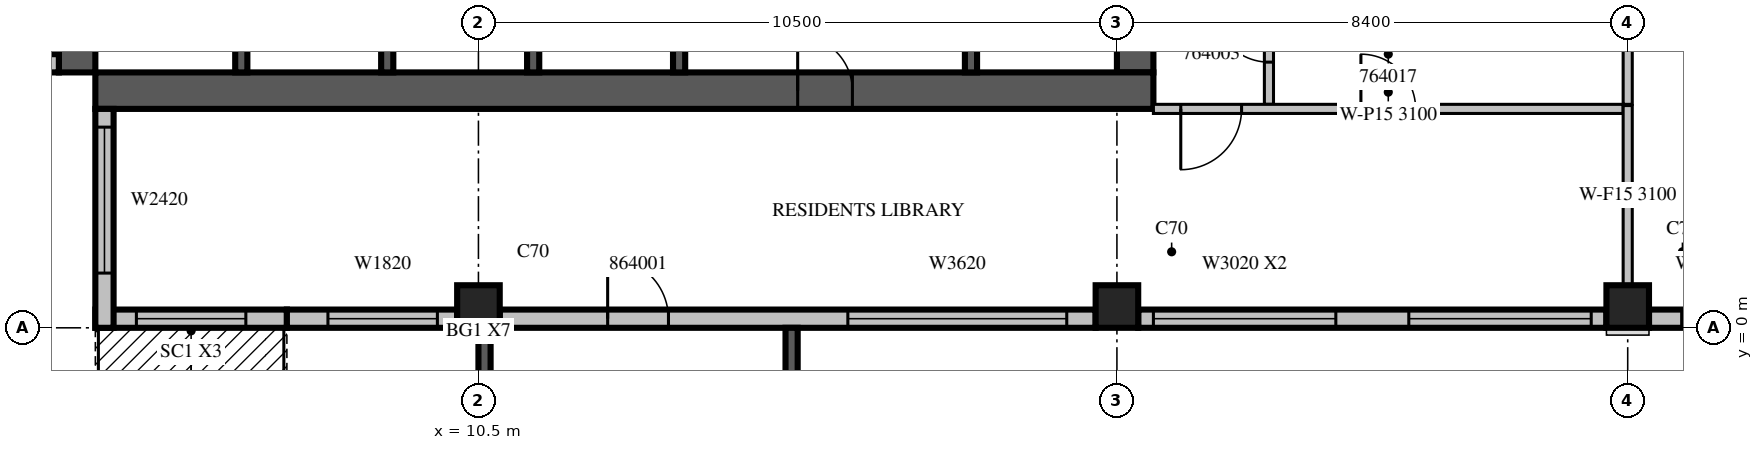
"""IFC4 building model, lengths in metres.
Left out: names, types, materials, properties, quantities, classifications, styles, units other than length and angle.
Written with IfcOpenShell. Run it as: python <this file> out.ifc"""

import sys

from ifc_helpers import new_model, si_unit, direction, frame, frame_2d, origin, origin_2d, place, context, subcontext, project, spatial, rectangle, extrude, source, transform, mapped, element, fill, save


model = new_model("IFC4")
c1 = context("Model", 3, precision=1e-05, world=origin(), true_north=direction((0.0, 1.0)))
c2 = subcontext(c1, "Body", "Model", "MODEL_VIEW")
j1 = project(units=[si_unit("LENGTHUNIT", "METRE"), si_unit("PLANEANGLEUNIT", "RADIAN")], contexts=[c1])
p1 = place(None, origin())
s1 = spatial("IfcSite", under=j1, at=p1, CompositionType="ELEMENT")
p2 = place(p1, origin())
s2 = spatial("IfcBuilding", under=s1, at=p2, CompositionType="ELEMENT")
p3 = place(p2, frame((0.0, 0.0, 284.5)))
s3 = spatial("IfcBuildingStorey", under=s2, at=p3, CompositionType="ELEMENT", Elevation=284.5)
p4 = place(p3, frame((10.5, 0.35, 0.0), z_axis=(0.0, 0.0, 1.0), x_axis=(1.0, 0.0, 0.0)))
e1 = element("IfcColumn", 1, at=p4, inside=s3, PredefinedType="COLUMN", context=c2, shape_type="SweptSolid", body=[
    extrude(rectangle(XDim=0.7, YDim=0.7, at=origin_2d()), origin(), (0.0, 0.0, 1.0), 3.5),
])
m1 = source(origin(), c2, "Body", "SweptSolid", [
    extrude(rectangle(XDim=0.7, YDim=0.7, at=origin_2d()), origin(), (0.0, 0.0, 1.0), 3.5),
])
for number, where, z_axis, x_axis in (
    (2, (21.0, 0.35, 0.0), (0.0, 0.0, 1.0), (1.0, 0.0, 0.0)),
    (3, (29.4, 0.35, 0.0), (0.0, 0.0, 1.0), (1.0, 0.0, 0.0)),
):
    element("IfcColumn", number, at=place(p3, frame(where, z_axis=z_axis, x_axis=x_axis)), inside=s3, PredefinedType="COLUMN", context=c2, shape_type="MappedRepresentation", body=[
        mapped(m1, transform((0.0, 0.0, 0.0), scale=1.0)),
    ])
p5 = place(p3, frame((3.9, 4.2, 0.0), z_axis=(0.0, 0.0, 1.0), x_axis=(0.0, 1.0, 0.0)))
e4 = element("IfcWall", 4, at=p5, inside=s3, PredefinedType="SHEAR", context=c2, shape_type="SweptSolid", body=[
    extrude(rectangle(XDim=17.4, YDim=0.6, at=frame_2d((8.7, 0.0))), origin(), (0.0, 0.0, 1.0), 3.5),
])
m2 = source(origin(), c2, "Body", "SweptSolid", [
    extrude(rectangle(XDim=2.2, YDim=2.1, at=frame_2d((1.1, 1.05))), frame((0.0, 0.31, 0.0), z_axis=(0.0, -1.0, 0.0), x_axis=(1.0, 0.0, 0.0)), (0.0, 0.0, 1.0), 0.62),
])
p6 = place(p5, frame((4.2, 0.0, 0.0)))
e5 = element("IfcOpeningElement", 5, at=p6, cuts=e4, PredefinedType="OPENING", context=c2, shape_type="MappedRepresentation", body=[
    mapped(m2, transform((0.0, 0.0, 0.0), scale=1.0)),
])
p7 = place(p3, frame((21.3, 4.2, 0.0), z_axis=(0.0, 0.0, 1.0), x_axis=(0.0, 1.0, 0.0)))
e6 = element("IfcWall", 6, at=p7, inside=s3, PredefinedType="SHEAR", context=c2, shape_type="SweptSolid", body=[
    extrude(rectangle(XDim=6.3, YDim=0.6, at=frame_2d((3.15, 0.0))), origin(), (0.0, 0.0, 1.0), 3.5),
])
p8 = place(p7, frame((4.0, 0.0, 0.0)))
e7 = element("IfcOpeningElement", 7, at=p8, cuts=e6, PredefinedType="OPENING", context=c2, shape_type="SweptSolid", body=[
    extrude(rectangle(XDim=2.2, YDim=2.1, at=frame_2d((1.1, 1.05))), frame((0.0, 0.31, 0.0), z_axis=(0.0, -1.0, 0.0), x_axis=(1.0, 0.0, 0.0)), (0.0, 0.0, 1.0), 0.62),
])
m3 = source(origin(), c2, "Body", "SweptSolid", [
    extrude(rectangle(XDim=17.4, YDim=0.6, at=frame_2d((8.7, 0.0))), origin(), (0.0, 0.0, 1.0), 3.5),
])
p9 = place(p3, frame((4.2, 3.9, 0.0), z_axis=(0.0, 0.0, 1.0), x_axis=(1.0, 0.0, 0.0)))
e8 = element("IfcWall", 8, at=p9, inside=s3, PredefinedType="SHEAR", context=c2, shape_type="MappedRepresentation", body=[
    mapped(m3, transform((0.0, 0.0, 0.0), scale=1.0)),
])
p10 = place(p9, frame((11.55, 0.0, 0.0)))
e9 = element("IfcOpeningElement", 9, at=p10, cuts=e8, PredefinedType="OPENING", context=c2, shape_type="SweptSolid", body=[
    extrude(rectangle(XDim=0.9, YDim=2.1, at=frame_2d((0.45, 1.05))), frame((0.0, 0.31, 0.0), z_axis=(0.0, -1.0, 0.0), x_axis=(1.0, 0.0, 0.0)), (0.0, 0.0, 1.0), 0.62),
])
p11 = place(p3, frame((4.2, 0.15, 0.0), z_axis=(0.0, 0.0, 1.0), x_axis=(1.0, 0.0, 0.0)))
e10 = element("IfcWall", 10, at=p11, inside=s3, PredefinedType="STANDARD", context=c2, shape_type="SweptSolid", body=[
    extrude(rectangle(XDim=3.15, YDim=0.3, at=frame_2d((1.575, 0.0))), origin(), (0.0, 0.0, 1.0), 3.1),
])
m4 = source(origin(), c2, "Body", "SweptSolid", [
    extrude(rectangle(XDim=1.8, YDim=2.4, at=frame_2d((0.9, 1.2))), frame((0.0, 0.16, 0.0), z_axis=(0.0, -1.0, 0.0), x_axis=(1.0, 0.0, 0.0)), (0.0, 0.0, 1.0), 0.32),
])
p12 = place(p11, frame((0.675, 0.0, 0.0)))
e11 = element("IfcOpeningElement", 11, at=p12, cuts=e10, PredefinedType="OPENING", context=c2, shape_type="MappedRepresentation", body=[
    mapped(m4, transform((0.0, 0.0, 0.0), scale=1.0)),
])
p13 = place(p3, frame((7.35, 0.15, 0.0), z_axis=(0.0, 0.0, 1.0), x_axis=(1.0, 0.0, 0.0)))
e12 = element("IfcWall", 12, at=p13, inside=s3, PredefinedType="STANDARD", context=c2, shape_type="SweptSolid", body=[
    extrude(rectangle(XDim=2.8, YDim=0.3, at=frame_2d((1.4, 0.0))), origin(), (0.0, 0.0, 1.0), 3.1),
])
p14 = place(p13, frame((0.675, 0.0, 0.6)))
e13 = element("IfcOpeningElement", 13, at=p14, cuts=e12, PredefinedType="OPENING", context=c2, shape_type="SweptSolid", body=[
    extrude(rectangle(XDim=1.8, YDim=2.0, at=frame_2d((0.9, 1.0))), frame((0.0, 0.16, 0.0), z_axis=(0.0, -1.0, 0.0), x_axis=(1.0, 0.0, 0.0)), (0.0, 0.0, 1.0), 0.32),
])
p15 = place(p3, frame((10.85, 0.15, 0.0), z_axis=(0.0, 0.0, 1.0), x_axis=(1.0, 0.0, 0.0)))
e14 = element("IfcWall", 14, at=p15, inside=s3, PredefinedType="STANDARD", context=c2, shape_type="SweptSolid", body=[
    extrude(rectangle(XDim=9.8, YDim=0.3, at=frame_2d((4.9, 0.0))), origin(), (0.0, 0.0, 1.0), 3.1),
])
p16 = place(p15, frame((5.725, 0.0, 0.6)))
e15 = element("IfcOpeningElement", 15, at=p16, cuts=e14, PredefinedType="OPENING", context=c2, shape_type="SweptSolid", body=[
    extrude(rectangle(XDim=3.6, YDim=2.0, at=frame_2d((1.8, 1.0))), frame((0.0, 0.16, 0.0), z_axis=(0.0, -1.0, 0.0), x_axis=(1.0, 0.0, 0.0)), (0.0, 0.0, 1.0), 0.32),
])
m5 = source(origin(), c2, "Body", "SweptSolid", [
    extrude(rectangle(XDim=1.0, YDim=2.1, at=frame_2d((0.5, 1.05))), frame((0.0, 0.16, 0.0), z_axis=(0.0, -1.0, 0.0), x_axis=(1.0, 0.0, 0.0)), (0.0, 0.0, 1.0), 0.32),
])
p17 = place(p15, frame((1.775, 0.0, 0.0)))
e16 = element("IfcOpeningElement", 16, at=p17, cuts=e14, PredefinedType="OPENING", context=c2, shape_type="MappedRepresentation", body=[
    mapped(m5, transform((0.0, 0.0, 0.0), scale=1.0)),
])
p18 = place(p3, frame((21.35, 0.15, 0.0), z_axis=(0.0, 0.0, 1.0), x_axis=(1.0, 0.0, 0.0)))
e17 = element("IfcWall", 17, at=p18, inside=s3, PredefinedType="STANDARD", context=c2, shape_type="SweptSolid", body=[
    extrude(rectangle(XDim=7.7, YDim=0.3, at=frame_2d((3.85, 0.0))), origin(), (0.0, 0.0, 1.0), 3.1),
])
p19 = place(p18, frame((0.25, 0.0, 0.6)))
e18 = element("IfcOpeningElement", 18, at=p19, cuts=e17, PredefinedType="OPENING", context=c2, shape_type="SweptSolid", body=[
    extrude(rectangle(XDim=3.0, YDim=2.0, at=frame_2d((1.5, 1.0))), frame((0.0, 0.16, 0.0), z_axis=(0.0, -1.0, 0.0), x_axis=(1.0, 0.0, 0.0)), (0.0, 0.0, 1.0), 0.32),
])
m6 = source(origin(), c2, "Body", "SweptSolid", [
    extrude(rectangle(XDim=3.0, YDim=2.0, at=frame_2d((1.5, 1.0))), frame((0.0, 0.16, 0.0), z_axis=(0.0, -1.0, 0.0), x_axis=(1.0, 0.0, 0.0)), (0.0, 0.0, 1.0), 0.32),
])
p20 = place(p18, frame((4.45, 0.0, 0.6)))
e19 = element("IfcOpeningElement", 19, at=p20, cuts=e17, PredefinedType="OPENING", context=c2, shape_type="MappedRepresentation", body=[
    mapped(m6, transform((0.0, 0.0, 0.0), scale=1.0)),
])
m7 = source(origin(), c2, "Body", "SweptSolid", [
    extrude(rectangle(XDim=7.7, YDim=0.3, at=frame_2d((3.85, 0.0))), origin(), (0.0, 0.0, 1.0), 3.1),
])
p21 = place(p3, frame((29.75, 0.15, 0.0), z_axis=(0.0, 0.0, 1.0), x_axis=(1.0, 0.0, 0.0)))
e20 = element("IfcWall", 20, at=p21, inside=s3, PredefinedType="STANDARD", context=c2, shape_type="MappedRepresentation", body=[
    mapped(m7, transform((0.0, 0.0, 0.0), scale=1.0)),
])
p22 = place(p21, frame((0.537, 0.0, 0.6)))
e21 = element("IfcOpeningElement", 21, at=p22, cuts=e20, PredefinedType="OPENING", context=c2, shape_type="SweptSolid", body=[
    extrude(rectangle(XDim=1.2, YDim=2.0, at=frame_2d((0.6, 1.0))), frame((0.0, 0.16, 0.0), z_axis=(0.0, -1.0, 0.0), x_axis=(1.0, 0.0, 0.0)), (0.0, 0.0, 1.0), 0.32),
])
m8 = source(origin(), c2, "Body", "SweptSolid", [
    extrude(rectangle(XDim=1.2, YDim=2.0, at=frame_2d((0.6, 1.0))), frame((0.0, 0.16, 0.0), z_axis=(0.0, -1.0, 0.0), x_axis=(1.0, 0.0, 0.0)), (0.0, 0.0, 1.0), 0.32),
])
p23 = place(p21, frame((6.062, 0.0, 0.6)))
e22 = element("IfcOpeningElement", 22, at=p23, cuts=e20, PredefinedType="OPENING", context=c2, shape_type="MappedRepresentation", body=[
    mapped(m8, transform((0.0, 0.0, 0.0), scale=1.0)),
])
p24 = place(p21, frame((2.7, 0.0, 0.6)))
e23 = element("IfcOpeningElement", 23, at=p24, cuts=e20, PredefinedType="OPENING", context=c2, shape_type="SweptSolid", body=[
    extrude(rectangle(XDim=2.4, YDim=2.0, at=frame_2d((1.2, 1.0))), frame((0.0, 0.16, 0.0), z_axis=(0.0, -1.0, 0.0), x_axis=(1.0, 0.0, 0.0)), (0.0, 0.0, 1.0), 0.32),
])
p25 = place(p3, frame((0.0, 4.35, 0.0), z_axis=(0.0, 0.0, 1.0), x_axis=(1.0, 0.0, 0.0)))
e24 = element("IfcWall", 24, at=p25, inside=s3, PredefinedType="STANDARD", context=c2, shape_type="SweptSolid", body=[
    extrude(rectangle(XDim=3.6, YDim=0.3, at=frame_2d((1.8, 0.0))), origin(), (0.0, 0.0, 1.0), 3.1),
])
m9 = source(origin(), c2, "Body", "SweptSolid", [
    extrude(rectangle(XDim=2.4, YDim=2.0, at=frame_2d((1.2, 1.0))), frame((0.0, 0.16, 0.0), z_axis=(0.0, -1.0, 0.0), x_axis=(1.0, 0.0, 0.0)), (0.0, 0.0, 1.0), 0.32),
])
p26 = place(p25, frame((0.9, 0.0, 0.6)))
e25 = element("IfcOpeningElement", 25, at=p26, cuts=e24, PredefinedType="OPENING", context=c2, shape_type="MappedRepresentation", body=[
    mapped(m9, transform((0.0, 0.0, 0.0), scale=1.0)),
])
m10 = source(origin(), c2, "Body", "SweptSolid", [
    extrude(rectangle(XDim=3.6, YDim=0.3, at=frame_2d((1.8, 0.0))), origin(), (0.0, 0.0, 1.0), 3.1),
])
p27 = place(p3, frame((4.35, 3.6, 0.0), z_axis=(0.0, 0.0, 1.0), x_axis=(0.0, -1.0, 0.0)))
e26 = element("IfcWall", 26, at=p27, inside=s3, PredefinedType="STANDARD", context=c2, shape_type="MappedRepresentation", body=[
    mapped(m10, transform((0.0, 0.0, 0.0), scale=1.0)),
])
p28 = place(p27, frame((0.3, 0.0, 0.6)))
e27 = element("IfcOpeningElement", 27, at=p28, cuts=e26, PredefinedType="OPENING", context=c2, shape_type="MappedRepresentation", body=[
    mapped(m9, transform((0.0, 0.0, 0.0), scale=1.0)),
])
p29 = place(p3, frame((10.6, 0.0, 0.0), z_axis=(0.0, 0.0, 1.0), x_axis=(0.0, -1.0, 0.0)))
e28 = element("IfcWall", 28, at=p29, inside=s3, PredefinedType="SOLIDWALL", context=c2, shape_type="SweptSolid", body=[
    extrude(rectangle(XDim=3.9, YDim=0.2, at=frame_2d((1.95, 0.0))), origin(), (0.0, 0.0, 1.0), 3.09),
])
p30 = place(p29, frame((0.75, 0.0, 0.6)))
e29 = element("IfcOpeningElement", 29, at=p30, cuts=e28, PredefinedType="OPENING", context=c2, shape_type="SweptSolid", body=[
    extrude(rectangle(XDim=2.4, YDim=2.0, at=frame_2d((1.2, 1.0))), frame((0.0, 0.11, 0.0), z_axis=(0.0, -1.0, 0.0), x_axis=(1.0, 0.0, 0.0)), (0.0, 0.0, 1.0), 0.22),
])
m11 = source(origin(), c2, "Body", "SweptSolid", [
    extrude(rectangle(XDim=3.9, YDim=0.2, at=frame_2d((1.95, 0.0))), origin(), (0.0, 0.0, 1.0), 3.09),
])
p31 = place(p3, frame((15.65, 0.0, 0.0), z_axis=(0.0, 0.0, 1.0), x_axis=(0.0, -1.0, 0.0)))
e30 = element("IfcWall", 30, at=p31, inside=s3, PredefinedType="SOLIDWALL", context=c2, shape_type="MappedRepresentation", body=[
    mapped(m11, transform((0.0, 0.0, 0.0), scale=1.0)),
])
m12 = source(origin(), c2, "Body", "SweptSolid", [
    extrude(rectangle(XDim=2.4, YDim=2.0, at=frame_2d((1.2, 1.0))), frame((0.0, 0.11, 0.0), z_axis=(0.0, -1.0, 0.0), x_axis=(1.0, 0.0, 0.0)), (0.0, 0.0, 1.0), 0.22),
])
p32 = place(p31, frame((0.75, 0.0, 0.6)))
e31 = element("IfcOpeningElement", 31, at=p32, cuts=e30, PredefinedType="OPENING", context=c2, shape_type="MappedRepresentation", body=[
    mapped(m12, transform((0.0, 0.0, 0.0), scale=1.0)),
])
p33 = place(p3, frame((6.6, 4.2, 0.0), z_axis=(0.0, 0.0, 1.0), x_axis=(0.0, 1.0, 0.0)))
e32 = element("IfcWall", 32, at=p33, inside=s3, PredefinedType="SOLIDWALL", context=c2, shape_type="SweptSolid", body=[
    extrude(rectangle(XDim=3.1, YDim=0.2, at=frame_2d((1.55, 0.0))), origin(), (0.0, 0.0, 1.0), 3.5),
])
m13 = source(origin(), c2, "Body", "SweptSolid", [
    extrude(rectangle(XDim=3.1, YDim=0.2, at=frame_2d((1.55, 0.0))), origin(), (0.0, 0.0, 1.0), 3.5),
])
for number, where, z_axis, x_axis in (
    (33, (9.0, 4.2, 0.0), (0.0, 0.0, 1.0), (0.0, 1.0, 0.0)),
    (34, (11.4, 4.2, 0.0), (0.0, 0.0, 1.0), (0.0, 1.0, 0.0)),
):
    element("IfcWall", number, at=place(p3, frame(where, z_axis=z_axis, x_axis=x_axis)), inside=s3, PredefinedType="SOLIDWALL", context=c2, shape_type="MappedRepresentation", body=[
        mapped(m13, transform((0.0, 0.0, 0.0), scale=1.0)),
    ])
p34 = place(p3, frame((13.8, 4.2, 0.0), z_axis=(0.0, 0.0, 1.0), x_axis=(0.0, 1.0, 0.0)))
e35 = element("IfcWall", 35, at=p34, inside=s3, PredefinedType="SOLIDWALL", context=c2, shape_type="SweptSolid", body=[
    extrude(rectangle(XDim=3.1, YDim=0.2, at=frame_2d((1.55, 0.0))), origin(), (0.0, 0.0, 1.0), 3.1),
])
m14 = source(origin(), c2, "Body", "SweptSolid", [
    extrude(rectangle(XDim=3.1, YDim=0.2, at=frame_2d((1.55, 0.0))), origin(), (0.0, 0.0, 1.0), 3.1),
])
p35 = place(p3, frame((18.6, 4.2, 0.0), z_axis=(0.0, 0.0, 1.0), x_axis=(0.0, 1.0, 0.0)))
e36 = element("IfcWall", 36, at=p35, inside=s3, PredefinedType="SOLIDWALL", context=c2, shape_type="MappedRepresentation", body=[
    mapped(m14, transform((0.0, 0.0, 0.0), scale=1.0)),
])
p36 = place(p3, frame((23.5, 8.25, 0.0), z_axis=(0.0, 0.0, 1.0), x_axis=(0.0, -1.0, 0.0)))
e37 = element("IfcWall", 37, at=p36, inside=s3, PredefinedType="PARTITIONING", context=c2, shape_type="SweptSolid", body=[
    extrude(rectangle(XDim=4.575, YDim=0.15, at=frame_2d((2.288, 0.0))), origin(), (0.0, 0.0, 1.0), 3.1),
])
m15 = source(origin(), c2, "Body", "SweptSolid", [
    extrude(rectangle(XDim=0.9, YDim=2.1, at=frame_2d((0.45, 1.05))), frame((0.0, 0.085, 0.0), z_axis=(0.0, -1.0, 0.0), x_axis=(1.0, 0.0, 0.0)), (0.0, 0.0, 1.0), 0.17),
])
p37 = place(p36, frame((2.981, 0.0, 0.0)))
e38 = element("IfcOpeningElement", 38, at=p37, cuts=e37, PredefinedType="OPENING", context=c2, shape_type="MappedRepresentation", body=[
    mapped(m15, transform((0.0, 0.0, 0.0), scale=1.0)),
])
m16 = source(origin(), c2, "Body", "SweptSolid", [
    extrude(rectangle(XDim=4.575, YDim=0.15, at=frame_2d((2.288, 0.0))), origin(), (0.0, 0.0, 1.0), 3.1),
])
p38 = place(p3, frame((29.4, 3.675, 0.0), z_axis=(0.0, 0.0, 1.0), x_axis=(0.0, 1.0, 0.0)))
e39 = element("IfcWall", 39, at=p38, inside=s3, PredefinedType="PARTITIONING", context=c2, shape_type="MappedRepresentation", body=[
    mapped(m16, transform((0.0, 0.0, 0.0), scale=1.0)),
])
p39 = place(p3, frame((21.6, 3.6, 0.0), z_axis=(0.0, 0.0, 1.0), x_axis=(1.0, 0.0, 0.0)))
e40 = element("IfcWall", 40, at=p39, inside=s3, PredefinedType="PARTITIONING", context=c2, shape_type="SweptSolid", body=[
    extrude(rectangle(XDim=7.725, YDim=0.15, at=frame_2d((3.862, 0.0))), origin(), (0.0, 0.0, 1.0), 3.1),
])
m17 = source(origin(), c2, "Body", "SweptSolid", [
    extrude(rectangle(XDim=1.0, YDim=2.1, at=frame_2d((0.5, 1.05))), frame((0.0, 0.085, 0.0), z_axis=(0.0, -1.0, 0.0), x_axis=(1.0, 0.0, 0.0)), (0.0, 0.0, 1.0), 0.17),
])
p40 = place(p39, frame((0.45, 0.0, 0.0)))
e41 = element("IfcOpeningElement", 41, at=p40, cuts=e40, PredefinedType="OPENING", context=c2, shape_type="MappedRepresentation", body=[
    mapped(m17, transform((0.0, 0.0, 0.0), scale=1.0)),
])
p41 = place(p39, frame((3.413, 0.0, 0.0)))
e42 = element("IfcOpeningElement", 42, at=p41, cuts=e40, PredefinedType="OPENING", context=c2, shape_type="MappedRepresentation", body=[
    mapped(m15, transform((0.0, 0.0, 0.0), scale=1.0)),
])
p42 = place(p3, frame((29.4, 0.699, 0.0), z_axis=(0.0, 0.0, 1.0), x_axis=(0.0, 1.0, 0.0)))
e43 = element("IfcWall", 43, at=p42, inside=s3, PredefinedType="PARTITIONING", context=c2, shape_type="SweptSolid", body=[
    extrude(rectangle(XDim=2.956, YDim=0.15, at=frame_2d((1.478, 0.0))), origin(), (0.0, 0.0, 1.0), 3.1),
])
m18 = source(origin(), c2, "Body", "SweptSolid", [
    extrude(rectangle(XDim=1.8, YDim=2.4, at=frame_2d((0.9, 1.2))), frame((0.0, 0.025, 0.0), z_axis=(0.0, -1.0, 0.0), x_axis=(1.0, 0.0, 0.0)), (0.0, 0.0, 1.0), 0.05),
])
p43 = place(p12, origin())
e44 = element("IfcDoor", 44, at=p43, inside=s3, OperationType="SLIDING_TO_LEFT", PredefinedType="DOOR", context=c2, shape_type="MappedRepresentation", body=[
    mapped(m18, transform((0.0, 0.0, 0.0), scale=1.0)),
])
fill(e11, e44)
p44 = place(p14, origin())
e45 = element("IfcWindow", 45, at=p44, inside=s3, PartitioningType="SINGLE_PANEL", PredefinedType="WINDOW", context=c2, shape_type="SweptSolid", body=[
    extrude(rectangle(XDim=1.8, YDim=2.0, at=frame_2d((0.9, 1.0))), frame((0.0, 0.03, 0.0), z_axis=(0.0, -1.0, 0.0), x_axis=(1.0, 0.0, 0.0)), (0.0, 0.0, 1.0), 0.06),
])
fill(e13, e45)
p45 = place(p16, origin())
e46 = element("IfcWindow", 46, at=p45, inside=s3, PartitioningType="SINGLE_PANEL", PredefinedType="WINDOW", context=c2, shape_type="SweptSolid", body=[
    extrude(rectangle(XDim=3.6, YDim=2.0, at=frame_2d((1.8, 1.0))), frame((0.0, 0.03, 0.0), z_axis=(0.0, -1.0, 0.0), x_axis=(1.0, 0.0, 0.0)), (0.0, 0.0, 1.0), 0.06),
])
fill(e15, e46)
p46 = place(p19, origin())
e47 = element("IfcWindow", 47, at=p46, inside=s3, PartitioningType="SINGLE_PANEL", PredefinedType="WINDOW", context=c2, shape_type="SweptSolid", body=[
    extrude(rectangle(XDim=3.0, YDim=2.0, at=frame_2d((1.5, 1.0))), frame((0.0, 0.03, 0.0), z_axis=(0.0, -1.0, 0.0), x_axis=(1.0, 0.0, 0.0)), (0.0, 0.0, 1.0), 0.06),
])
fill(e18, e47)
m19 = source(origin(), c2, "Body", "SweptSolid", [
    extrude(rectangle(XDim=3.0, YDim=2.0, at=frame_2d((1.5, 1.0))), frame((0.0, 0.03, 0.0), z_axis=(0.0, -1.0, 0.0), x_axis=(1.0, 0.0, 0.0)), (0.0, 0.0, 1.0), 0.06),
])
p47 = place(p20, origin())
e48 = element("IfcWindow", 48, at=p47, inside=s3, PartitioningType="SINGLE_PANEL", PredefinedType="WINDOW", context=c2, shape_type="MappedRepresentation", body=[
    mapped(m19, transform((0.0, 0.0, 0.0), scale=1.0)),
])
fill(e19, e48)
p48 = place(p22, origin())
e49 = element("IfcWindow", 49, at=p48, inside=s3, PartitioningType="SINGLE_PANEL", PredefinedType="WINDOW", context=c2, shape_type="SweptSolid", body=[
    extrude(rectangle(XDim=1.2, YDim=2.0, at=frame_2d((0.6, 1.0))), frame((0.0, 0.03, 0.0), z_axis=(0.0, -1.0, 0.0), x_axis=(1.0, 0.0, 0.0)), (0.0, 0.0, 1.0), 0.06),
])
fill(e21, e49)
m20 = source(origin(), c2, "Body", "SweptSolid", [
    extrude(rectangle(XDim=2.4, YDim=2.0, at=frame_2d((1.2, 1.0))), frame((0.0, 0.03, 0.0), z_axis=(0.0, -1.0, 0.0), x_axis=(1.0, 0.0, 0.0)), (0.0, 0.0, 1.0), 0.06),
])
p49 = place(p28, origin())
e50 = element("IfcWindow", 50, at=p49, inside=s3, PartitioningType="SINGLE_PANEL", PredefinedType="WINDOW", context=c2, shape_type="MappedRepresentation", body=[
    mapped(m20, transform((0.0, 0.0, 0.0), scale=1.0)),
])
fill(e27, e50)
m21 = source(origin(), c2, "Body", "SweptSolid", [
    extrude(rectangle(XDim=0.9, YDim=2.1, at=frame_2d((0.45, 1.05))), frame((0.0, 0.025, 0.0), z_axis=(0.0, -1.0, 0.0), x_axis=(1.0, 0.0, 0.0)), (0.0, 0.0, 1.0), 0.05),
])
p50 = place(p10, origin())
e51 = element("IfcDoor", 51, at=p50, inside=s3, OperationType="SINGLE_SWING_LEFT", PredefinedType="DOOR", context=c2, shape_type="MappedRepresentation", body=[
    mapped(m21, transform((0.0, 0.0, 0.0), scale=1.0)),
])
fill(e9, e51)
p51 = place(p37, origin())
e52 = element("IfcDoor", 52, at=p51, inside=s3, OperationType="SINGLE_SWING_RIGHT", PredefinedType="DOOR", context=c2, shape_type="MappedRepresentation", body=[
    mapped(m21, transform((0.0, 0.0, 0.0), scale=1.0)),
])
fill(e38, e52)
m22 = source(origin(), c2, "Body", "SweptSolid", [
    extrude(rectangle(XDim=1.0, YDim=2.1, at=frame_2d((0.5, 1.05))), frame((0.0, 0.025, 0.0), z_axis=(0.0, -1.0, 0.0), x_axis=(1.0, 0.0, 0.0)), (0.0, 0.0, 1.0), 0.05),
])
p52 = place(p40, origin())
e53 = element("IfcDoor", 53, at=p52, inside=s3, OperationType="SINGLE_SWING_RIGHT", PredefinedType="DOOR", context=c2, shape_type="MappedRepresentation", body=[
    mapped(m22, transform((0.0, 0.0, 0.0), scale=1.0)),
])
fill(e41, e53)
p53 = place(p41, origin())
e54 = element("IfcDoor", 54, at=p53, inside=s3, OperationType="SINGLE_SWING_LEFT", PredefinedType="DOOR", context=c2, shape_type="MappedRepresentation", body=[
    mapped(m21, transform((0.0, 0.0, 0.0), scale=1.0)),
])
fill(e42, e54)
p54 = place(p17, origin())
e55 = element("IfcDoor", 55, at=p54, inside=s3, OperationType="SINGLE_SWING_LEFT", PredefinedType="DOOR", context=c2, shape_type="MappedRepresentation", body=[
    mapped(m22, transform((0.0, 0.0, 0.0), scale=1.0)),
])
fill(e16, e55)
save(model, sys.argv[1])
